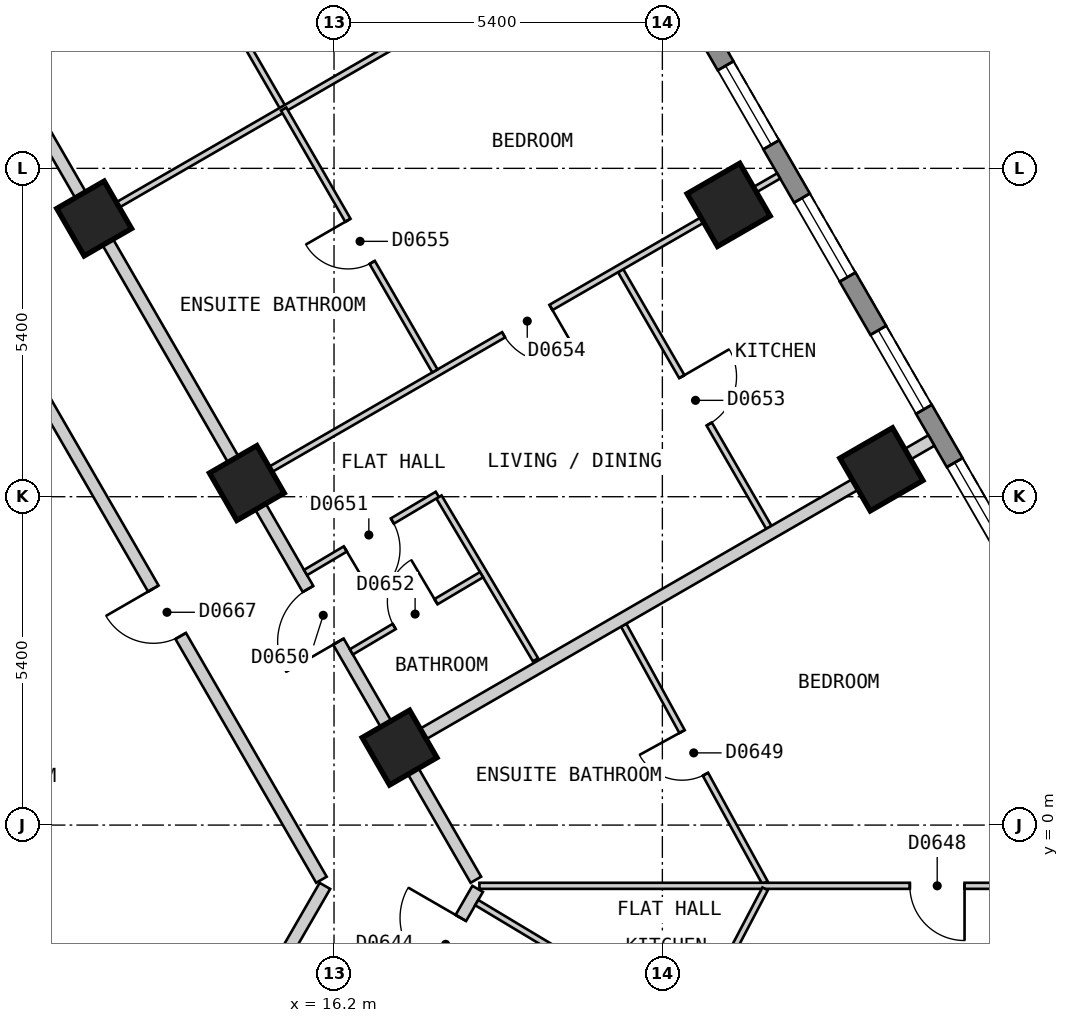
"""IFC4 building model, lengths in metres.
Left out: names, types, materials, properties, quantities, classifications, styles, units other than length and angle.
Written with IfcOpenShell. Run it as: python <this file> out.ifc"""

import sys

from ifc_helpers import new_model, si_unit, direction, frame, frame_2d, origin, origin_2d, place, context, subcontext, project, spatial, polyline, rectangle, outline, extrude, element, fill, save


model = new_model("IFC4")
c1 = context("Model", 3, precision=1e-05, world=origin(), true_north=direction((0.0, 1.0)))
c2 = subcontext(c1, "Body", "Model", "MODEL_VIEW")
j1 = project(units=[si_unit("LENGTHUNIT", "METRE"), si_unit("PLANEANGLEUNIT", "RADIAN")], contexts=[c1])
p1 = place(None, origin())
s1 = spatial("IfcSite", under=j1, at=p1, CompositionType="ELEMENT")
p2 = place(p1, origin())
s2 = spatial("IfcBuilding", under=s1, at=p2, CompositionType="ELEMENT")
p3 = place(p2, frame((0.0, 0.0, 75.0)))
s3 = spatial("IfcBuildingStorey", under=s2, at=p3, CompositionType="ELEMENT", Elevation=75.0)
for number, where, z_axis, x_axis in (
    (1, (25.202, 5.85, 0.0), (0.0, 0.0, 1.0), (-0.5, 0.866, 0.0)),
    (2, (22.69, 10.2, 0.0), (0.0, 0.0, 1.0), (-0.5, 0.866, 0.0)),
):
    element("IfcColumn", number, at=place(p3, frame(where, z_axis=z_axis, x_axis=x_axis)), inside=s3, PredefinedType="COLUMN", context=c2, shape_type="SweptSolid", body=[
        extrude(rectangle(XDim=1.0, YDim=1.0, at=origin_2d()), origin(), (0.0, 0.0, 1.0), 3.0),
    ])
for number, where, z_axis, x_axis in (
    (3, (17.278, 1.274, 0.0), (0.0, 0.0, 1.0), (-0.5, 0.866, 0.0)),
    (4, (14.766, 5.625, 0.0), (0.0, 0.0, 1.0), (-0.5, 0.866, 0.0)),
    (5, (12.255, 9.975, 0.0), (0.0, 0.0, 1.0), (-0.5, 0.866, 0.0)),
):
    element("IfcColumn", number, at=place(p3, frame(where, z_axis=z_axis, x_axis=x_axis)), inside=s3, PredefinedType="COLUMN", context=c2, shape_type="SweptSolid", body=[
        extrude(rectangle(XDim=0.9, YDim=0.9, at=origin_2d()), origin(), (0.0, 0.0, 1.0), 3.0),
    ])
p4 = place(p3, frame((29.027, 1.425, 0.0), z_axis=(0.0, 0.0, 1.0), x_axis=(-0.500027479704, 0.866009537788, 0.0)))
e6 = element("IfcWall", 6, at=p4, inside=s3, PredefinedType="SOLIDWALL", context=c2, shape_type="SweptSolid", body=[
    extrude(outline(polyline([(0.0, -0.15), (26.559, -0.15), (26.478, 0.15), (0.08, 0.15), (0.0, -0.15)])), origin(), (0.0, 0.0, 1.0), 2.7),
])
p5 = place(p4, frame((1.227, 0.0, 0.15)))
e7 = element("IfcOpeningElement", 7, at=p5, cuts=e6, PredefinedType="OPENING", context=c2, shape_type="SweptSolid", body=[
    extrude(rectangle(XDim=1.5, YDim=2.1, at=frame_2d((0.75, 1.05))), frame((0.0, 0.16, 0.0), z_axis=(0.0, -1.0, 0.0), x_axis=(1.0, 0.0, 0.0)), (0.0, 0.0, 1.0), 0.32),
])
p6 = place(p4, frame((3.738, 0.0, 0.15)))
e8 = element("IfcOpeningElement", 8, at=p6, cuts=e6, PredefinedType="OPENING", context=c2, shape_type="SweptSolid", body=[
    extrude(rectangle(XDim=1.5, YDim=2.1, at=frame_2d((0.75, 1.05))), frame((0.0, 0.16, 0.0), z_axis=(0.0, -1.0, 0.0), x_axis=(1.0, 0.0, 0.0)), (0.0, 0.0, 1.0), 0.32),
])
p7 = place(p4, frame((6.25, 0.0, 0.15)))
e9 = element("IfcOpeningElement", 9, at=p7, cuts=e6, PredefinedType="OPENING", context=c2, shape_type="SweptSolid", body=[
    extrude(rectangle(XDim=1.5, YDim=2.1, at=frame_2d((0.75, 1.05))), frame((0.0, 0.16, 0.0), z_axis=(0.0, -1.0, 0.0), x_axis=(1.0, 0.0, 0.0)), (0.0, 0.0, 1.0), 0.32),
])
p8 = place(p4, frame((8.761, 0.0, 0.15)))
e10 = element("IfcOpeningElement", 10, at=p8, cuts=e6, PredefinedType="OPENING", context=c2, shape_type="SweptSolid", body=[
    extrude(rectangle(XDim=1.5, YDim=2.1, at=frame_2d((0.75, 1.05))), frame((0.0, 0.16, 0.0), z_axis=(0.0, -1.0, 0.0), x_axis=(1.0, 0.0, 0.0)), (0.0, 0.0, 1.0), 0.32),
])
p9 = place(p4, frame((11.273, 0.0, 0.15)))
e11 = element("IfcOpeningElement", 11, at=p9, cuts=e6, PredefinedType="OPENING", context=c2, shape_type="SweptSolid", body=[
    extrude(rectangle(XDim=1.5, YDim=2.1, at=frame_2d((0.75, 1.05))), frame((0.0, 0.16, 0.0), z_axis=(0.0, -1.0, 0.0), x_axis=(1.0, 0.0, 0.0)), (0.0, 0.0, 1.0), 0.32),
])
p10 = place(p4, frame((13.785, 0.0, 0.15)))
e12 = element("IfcOpeningElement", 12, at=p10, cuts=e6, PredefinedType="OPENING", context=c2, shape_type="SweptSolid", body=[
    extrude(rectangle(XDim=1.5, YDim=2.1, at=frame_2d((0.75, 1.05))), frame((0.0, 0.16, 0.0), z_axis=(0.0, -1.0, 0.0), x_axis=(1.0, 0.0, 0.0)), (0.0, 0.0, 1.0), 0.32),
])
p11 = place(p4, frame((16.296, 0.0, 0.15)))
e13 = element("IfcOpeningElement", 13, at=p11, cuts=e6, PredefinedType="OPENING", context=c2, shape_type="SweptSolid", body=[
    extrude(rectangle(XDim=1.5, YDim=2.1, at=frame_2d((0.75, 1.05))), frame((0.0, 0.16, 0.0), z_axis=(0.0, -1.0, 0.0), x_axis=(1.0, 0.0, 0.0)), (0.0, 0.0, 1.0), 0.32),
])
p12 = place(p4, frame((18.807, 0.0, 0.15)))
e14 = element("IfcOpeningElement", 14, at=p12, cuts=e6, PredefinedType="OPENING", context=c2, shape_type="SweptSolid", body=[
    extrude(rectangle(XDim=1.5, YDim=2.1, at=frame_2d((0.75, 1.05))), frame((0.0, 0.16, 0.0), z_axis=(0.0, -1.0, 0.0), x_axis=(1.0, 0.0, 0.0)), (0.0, 0.0, 1.0), 0.32),
])
p13 = place(p4, frame((21.319, 0.0, 0.15)))
e15 = element("IfcOpeningElement", 15, at=p13, cuts=e6, PredefinedType="OPENING", context=c2, shape_type="SweptSolid", body=[
    extrude(rectangle(XDim=1.5, YDim=2.1, at=frame_2d((0.75, 1.05))), frame((0.0, 0.16, 0.0), z_axis=(0.0, -1.0, 0.0), x_axis=(1.0, 0.0, 0.0)), (0.0, 0.0, 1.0), 0.32),
])
p14 = place(p4, frame((23.831, 0.0, 0.15)))
e16 = element("IfcOpeningElement", 16, at=p14, cuts=e6, PredefinedType="OPENING", context=c2, shape_type="SweptSolid", body=[
    extrude(rectangle(XDim=1.5, YDim=2.1, at=frame_2d((0.75, 1.05))), frame((0.0, 0.16, 0.0), z_axis=(0.0, -1.0, 0.0), x_axis=(1.0, 0.0, 0.0)), (0.0, 0.0, 1.0), 0.32),
])
p15 = place(p3, frame((10.913, 7.899, 0.0), z_axis=(0.0, 0.0, 1.0), x_axis=(0.500028940566, -0.866008694296, 0.0)))
e17 = element("IfcWall", 17, at=p15, inside=s3, PredefinedType="PARTITIONING", context=c2, shape_type="SweptSolid", body=[
    extrude(rectangle(XDim=10.159, YDim=0.2, at=frame_2d((5.08, 0.0))), origin(), (0.0, 0.0, 1.0), 2.7),
])
p16 = place(p15, frame((4.63, 0.0, 0.0)))
e18 = element("IfcOpeningElement", 18, at=p16, cuts=e17, PredefinedType="OPENING", context=c2, shape_type="SweptSolid", body=[
    extrude(rectangle(XDim=0.9, YDim=2.1, at=frame_2d((0.45, 1.05))), frame((0.0, 0.11, 0.0), z_axis=(0.0, -1.0, 0.0), x_axis=(1.0, 0.0, 0.0)), (0.0, 0.0, 1.0), 0.22),
])
p17 = place(p3, frame((8.488, 16.5, 0.0), z_axis=(0.0, 0.0, 1.0), x_axis=(0.499986836607, -0.86603300354, 0.0)))
e19 = element("IfcWall", 19, at=p17, inside=s3, PredefinedType="PARTITIONING", context=c2, shape_type="SweptSolid", body=[
    extrude(rectangle(XDim=20.09, YDim=0.2, at=frame_2d((10.045, 0.0))), origin(), (0.0, 0.0, 1.0), 2.7),
])
p18 = place(p17, frame((14.569, 0.0, 0.0)))
e20 = element("IfcOpeningElement", 20, at=p18, cuts=e19, PredefinedType="OPENING", context=c2, shape_type="SweptSolid", body=[
    extrude(rectangle(XDim=1.0, YDim=2.1, at=frame_2d((0.5, 1.05))), frame((0.0, 0.11, 0.0), z_axis=(0.0, -1.0, 0.0), x_axis=(1.0, 0.0, 0.0)), (0.0, 0.0, 1.0), 0.22),
])
p19 = place(p3, frame((15.011, -2.8, 0.0), z_axis=(0.0, 0.0, 1.0), x_axis=(0.499929208183, 0.866066271601, 0.0)))
e21 = element("IfcWall", 21, at=p19, inside=s3, PredefinedType="PARTITIONING", context=c2, shape_type="SweptSolid", body=[
    extrude(rectangle(XDim=2.078, YDim=0.2, at=frame_2d((1.039, 0.0))), origin(), (0.0, 0.0, 1.0), 2.7),
])
p20 = place(p3, frame((15.771, -5.884, 0.0), z_axis=(0.0, 0.0, 1.0), x_axis=(0.499939494019, 0.866060334111, 0.0)))
e22 = element("IfcWall", 22, at=p20, inside=s3, PredefinedType="PARTITIONING", context=c2, shape_type="SweptSolid", body=[
    extrude(rectangle(XDim=5.583, YDim=0.2, at=frame_2d((2.792, 0.0))), origin(), (0.0, 0.0, 1.0), 2.7),
])
p21 = place(p20, frame((4.03, 0.0, 0.0)))
e23 = element("IfcOpeningElement", 23, at=p21, cuts=e22, PredefinedType="OPENING", context=c2, shape_type="SweptSolid", body=[
    extrude(rectangle(XDim=1.0, YDim=2.1, at=frame_2d((0.5, 1.05))), frame((0.0, 0.11, 0.0), z_axis=(0.0, -1.0, 0.0), x_axis=(1.0, 0.0, 0.0)), (0.0, 0.0, 1.0), 0.22),
])
p22 = place(p3, frame((17.926, 5.396, 0.0), z_axis=(0.0, 0.0, 1.0), x_axis=(0.510025922017, -0.860159031151, 0.0)))
e24 = element("IfcWall", 24, at=p22, inside=s3, PredefinedType="PARTITIONING", context=c2, shape_type="SweptSolid", body=[
    extrude(rectangle(XDim=3.113, YDim=0.1, at=frame_2d((1.557, 0.0))), origin(), (0.0, 0.0, 1.0), 2.7),
])
p23 = place(p3, frame((12.911, 16.038, 0.0), z_axis=(0.0, 0.0, 1.0), x_axis=(0.499974319101, -0.866040230151, 0.0)))
e25 = element("IfcWall", 25, at=p23, inside=s3, PredefinedType="PARTITIONING", context=c2, shape_type="SweptSolid", body=[
    extrude(rectangle(XDim=4.923, YDim=0.1, at=frame_2d((2.461, 0.0))), origin(), (0.0, 0.0, 1.0), 2.7),
])
p24 = place(p23, frame((2.012, 0.0, 0.0)))
e26 = element("IfcOpeningElement", 26, at=p24, cuts=e25, PredefinedType="OPENING", context=c2, shape_type="SweptSolid", body=[
    extrude(rectangle(XDim=0.8, YDim=2.1, at=frame_2d((0.4, 1.05))), frame((0.0, 0.06, 0.0), z_axis=(0.0, -1.0, 0.0), x_axis=(1.0, 0.0, 0.0)), (0.0, 0.0, 1.0), 0.12),
])
p25 = place(p3, frame((20.914, 9.117, 0.0), z_axis=(0.0, 0.0, 1.0), x_axis=(0.500007182864, -0.866021256716, 0.0)))
e27 = element("IfcWall", 27, at=p25, inside=s3, PredefinedType="PARTITIONING", context=c2, shape_type="SweptSolid", body=[
    extrude(rectangle(XDim=4.874, YDim=0.1, at=frame_2d((2.437, 0.0))), origin(), (0.0, 0.0, 1.0), 2.7),
])
p26 = place(p25, frame((2.012, 0.0, 0.0)))
e28 = element("IfcOpeningElement", 28, at=p26, cuts=e27, PredefinedType="OPENING", context=c2, shape_type="SweptSolid", body=[
    extrude(rectangle(XDim=0.9, YDim=2.1, at=frame_2d((0.45, 1.05))), frame((0.0, 0.06, 0.0), z_axis=(0.0, -1.0, 0.0), x_axis=(1.0, 0.0, 0.0)), (0.0, 0.0, 1.0), 0.12),
])
p27 = place(p3, frame((20.964, 3.287, 0.0), z_axis=(0.0, 0.0, 1.0), x_axis=(0.4810005962, -0.876720266936, 0.0)))
e29 = element("IfcWall", 29, at=p27, inside=s3, PredefinedType="PARTITIONING", context=c2, shape_type="SweptSolid", body=[
    extrude(rectangle(XDim=4.83, YDim=0.1, at=frame_2d((2.415, 0.0))), origin(), (0.0, 0.0, 1.0), 2.7),
])
p28 = place(p27, frame((1.995, 0.0, 0.0)))
e30 = element("IfcOpeningElement", 30, at=p28, cuts=e29, PredefinedType="OPENING", context=c2, shape_type="SweptSolid", body=[
    extrude(rectangle(XDim=0.8, YDim=2.1, at=frame_2d((0.4, 1.05))), frame((0.0, 0.06, 0.0), z_axis=(0.0, -1.0, 0.0), x_axis=(1.0, 0.0, 0.0)), (0.0, 0.0, 1.0), 0.12),
])
p29 = place(p3, frame((18.547, -1.275, 0.0), z_axis=(0.0, 0.0, 1.0), x_axis=(0.85733334763, -0.514761625456, 0.0)))
e31 = element("IfcWall", 31, at=p29, inside=s3, PredefinedType="PARTITIONING", context=c2, shape_type="SweptSolid", body=[
    extrude(rectangle(XDim=4.051, YDim=0.1, at=frame_2d((2.025, 0.0))), origin(), (0.0, 0.0, 1.0), 2.7),
])
p30 = place(p29, frame((1.55, 0.0, 0.0)))
e32 = element("IfcOpeningElement", 32, at=p30, cuts=e31, PredefinedType="OPENING", context=c2, shape_type="SweptSolid", body=[
    extrude(rectangle(XDim=0.9, YDim=2.1, at=frame_2d((0.45, 1.05))), frame((0.0, 0.06, 0.0), z_axis=(0.0, -1.0, 0.0), x_axis=(1.0, 0.0, 0.0)), (0.0, 0.0, 1.0), 0.12),
])
p31 = place(p3, frame((18.591, -0.999, 0.0), z_axis=(0.0, 0.0, 1.0), x_axis=(1.0, 0.0, 0.0)))
e33 = element("IfcWall", 33, at=p31, inside=s3, PredefinedType="PARTITIONING", context=c2, shape_type="SweptSolid", body=[
    extrude(rectangle(XDim=10.266, YDim=0.1, at=frame_2d((5.133, 0.0))), origin(), (0.0, 0.0, 1.0), 2.7),
])
p32 = place(p31, frame((7.079, 0.0, 0.0)))
e34 = element("IfcOpeningElement", 34, at=p32, cuts=e33, PredefinedType="OPENING", context=c2, shape_type="SweptSolid", body=[
    extrude(rectangle(XDim=0.9, YDim=2.1, at=frame_2d((0.45, 1.05))), frame((0.0, 0.06, 0.0), z_axis=(0.0, -1.0, 0.0), x_axis=(1.0, 0.0, 0.0)), (0.0, 0.0, 1.0), 0.12),
])
p33 = place(p3, frame((22.053, -3.403, 0.0), z_axis=(0.0, 0.0, 1.0), x_axis=(0.465190117005, 0.885210796952, 0.0)))
e35 = element("IfcWall", 35, at=p33, inside=s3, PredefinedType="PARTITIONING", context=c2, shape_type="SweptSolid", body=[
    extrude(rectangle(XDim=2.659, YDim=0.1, at=frame_2d((1.33, 0.0))), origin(), (0.0, 0.0, 1.0), 2.7),
])
p34 = place(p3, frame((14.853, 5.675, 0.0), z_axis=(0.0, 0.0, 1.0), x_axis=(0.866016855193, 0.500014806302, 0.0)))
e36 = element("IfcWall", 36, at=p34, inside=s3, PredefinedType="PARTITIONING", context=c2, shape_type="SweptSolid", body=[
    extrude(rectangle(XDim=10.0, YDim=0.1, at=frame_2d((5.0, 0.0))), origin(), (0.0, 0.0, 1.0), 2.7),
])
p35 = place(p34, frame((4.775, 0.0, 0.0)))
e37 = element("IfcOpeningElement", 37, at=p35, cuts=e36, PredefinedType="OPENING", context=c2, shape_type="SweptSolid", body=[
    extrude(rectangle(XDim=0.9, YDim=2.1, at=frame_2d((0.45, 1.05))), frame((0.0, 0.06, 0.0), z_axis=(0.0, -1.0, 0.0), x_axis=(1.0, 0.0, 0.0)), (0.0, 0.0, 1.0), 0.12),
])
p36 = place(p3, frame((12.342, 10.025, 0.0), z_axis=(0.0, 0.0, 1.0), x_axis=(0.865992435864, 0.500057097767, 0.0)))
e38 = element("IfcWall", 38, at=p36, inside=s3, PredefinedType="PARTITIONING", context=c2, shape_type="SweptSolid", body=[
    extrude(rectangle(XDim=9.999, YDim=0.1, at=frame_2d((5.0, 0.0))), origin(), (0.0, 0.0, 1.0), 2.7),
])
p37 = place(p36, frame((6.3, 0.0, 0.0)))
e39 = element("IfcOpeningElement", 39, at=p37, cuts=e38, PredefinedType="OPENING", context=c2, shape_type="SweptSolid", body=[
    extrude(rectangle(XDim=0.9, YDim=2.1, at=frame_2d((0.45, 1.05))), frame((0.0, 0.06, 0.0), z_axis=(0.0, -1.0, 0.0), x_axis=(1.0, 0.0, 0.0)), (0.0, 0.0, 1.0), 0.12),
])
p38 = place(p3, frame((15.732, 4.153, 0.0), z_axis=(0.0, 0.0, 1.0), x_axis=(0.859987631152, 0.510314877566, 0.0)))
e40 = element("IfcWall", 40, at=p38, inside=s3, PredefinedType="PARTITIONING", context=c2, shape_type="SweptSolid", body=[
    extrude(rectangle(XDim=2.52, YDim=0.1, at=frame_2d((1.26, 0.0))), origin(), (0.0, 0.0, 1.0), 2.7),
])
p39 = place(p38, frame((0.76, 0.0, 0.0)))
e41 = element("IfcOpeningElement", 41, at=p39, cuts=e40, PredefinedType="OPENING", context=c2, shape_type="SweptSolid", body=[
    extrude(rectangle(XDim=0.9, YDim=2.1, at=frame_2d((0.45, 1.05))), frame((0.0, 0.06, 0.0), z_axis=(0.0, -1.0, 0.0), x_axis=(1.0, 0.0, 0.0)), (0.0, 0.0, 1.0), 0.12),
])
p40 = place(p3, frame((16.485, 2.848, 0.0), z_axis=(0.0, 0.0, 1.0), x_axis=(0.860052465539, 0.510205602205, 0.0)))
e42 = element("IfcWall", 42, at=p40, inside=s3, PredefinedType="PARTITIONING", context=c2, shape_type="SweptSolid", body=[
    extrude(rectangle(XDim=2.489, YDim=0.1, at=frame_2d((1.245, 0.0))), origin(), (0.0, 0.0, 1.0), 2.7),
])
p41 = place(p40, frame((0.819, 0.0, 0.0)))
e43 = element("IfcOpeningElement", 43, at=p41, cuts=e42, PredefinedType="OPENING", context=c2, shape_type="SweptSolid", body=[
    extrude(rectangle(XDim=0.8, YDim=2.1, at=frame_2d((0.4, 1.05))), frame((0.0, 0.06, 0.0), z_axis=(0.0, -1.0, 0.0), x_axis=(1.0, 0.0, 0.0)), (0.0, 0.0, 1.0), 0.12),
])
p42 = place(p3, frame((17.365, 1.325, 0.0), z_axis=(0.0, 0.0, 1.0), x_axis=(0.866016855193, 0.500014806302, 0.0)))
e44 = element("IfcWall", 44, at=p42, inside=s3, PredefinedType="PARTITIONING", context=c2, shape_type="SweptSolid", body=[
    extrude(rectangle(XDim=10.0, YDim=0.2, at=frame_2d((5.0, 0.0))), origin(), (0.0, 0.0, 1.0), 2.7),
])
p43 = place(p3, frame((15.372, 11.775, 0.0), z_axis=(0.0, 0.0, 1.0), x_axis=(0.500035488351, -0.866004913606, 0.0)))
e45 = element("IfcWall", 45, at=p43, inside=s3, PredefinedType="PARTITIONING", context=c2, shape_type="SweptSolid", body=[
    extrude(rectangle(XDim=4.973, YDim=0.1, at=frame_2d((2.487, 0.0))), origin(), (0.0, 0.0, 1.0), 2.7),
])
p44 = place(p43, frame((2.112, 0.0, 0.0)))
e46 = element("IfcOpeningElement", 46, at=p44, cuts=e45, PredefinedType="OPENING", context=c2, shape_type="SweptSolid", body=[
    extrude(rectangle(XDim=0.8, YDim=2.1, at=frame_2d((0.4, 1.05))), frame((0.0, 0.06, 0.0), z_axis=(0.0, -1.0, 0.0), x_axis=(1.0, 0.0, 0.0)), (0.0, 0.0, 1.0), 0.12),
])
p45 = place(p6, origin())
e47 = element("IfcWindow", 47, at=p45, inside=s3, PartitioningType="SINGLE_PANEL", PredefinedType="WINDOW", context=c2, shape_type="SweptSolid", body=[
    extrude(rectangle(XDim=1.5, YDim=2.1, at=frame_2d((0.75, 1.05))), frame((0.0, 0.03, 0.0), z_axis=(0.0, -1.0, 0.0), x_axis=(1.0, 0.0, 0.0)), (0.0, 0.0, 1.0), 0.06),
])
fill(e8, e47)
p46 = place(p7, origin())
e48 = element("IfcWindow", 48, at=p46, inside=s3, PartitioningType="SINGLE_PANEL", PredefinedType="WINDOW", context=c2, shape_type="SweptSolid", body=[
    extrude(rectangle(XDim=1.5, YDim=2.1, at=frame_2d((0.75, 1.05))), frame((0.0, 0.03, 0.0), z_axis=(0.0, -1.0, 0.0), x_axis=(1.0, 0.0, 0.0)), (0.0, 0.0, 1.0), 0.06),
])
fill(e9, e48)
p47 = place(p8, origin())
e49 = element("IfcWindow", 49, at=p47, inside=s3, PartitioningType="SINGLE_PANEL", PredefinedType="WINDOW", context=c2, shape_type="SweptSolid", body=[
    extrude(rectangle(XDim=1.5, YDim=2.1, at=frame_2d((0.75, 1.05))), frame((0.0, 0.03, 0.0), z_axis=(0.0, -1.0, 0.0), x_axis=(1.0, 0.0, 0.0)), (0.0, 0.0, 1.0), 0.06),
])
fill(e10, e49)
p48 = place(p9, origin())
e50 = element("IfcWindow", 50, at=p48, inside=s3, PartitioningType="SINGLE_PANEL", PredefinedType="WINDOW", context=c2, shape_type="SweptSolid", body=[
    extrude(rectangle(XDim=1.5, YDim=2.1, at=frame_2d((0.75, 1.05))), frame((0.0, 0.03, 0.0), z_axis=(0.0, -1.0, 0.0), x_axis=(1.0, 0.0, 0.0)), (0.0, 0.0, 1.0), 0.06),
])
fill(e11, e50)
p49 = place(p21, origin())
e51 = element("IfcDoor", 51, at=p49, inside=s3, OperationType="SINGLE_SWING_RIGHT", PredefinedType="DOOR", context=c2, shape_type="SweptSolid", body=[
    extrude(rectangle(XDim=1.0, YDim=2.1, at=frame_2d((0.5, 1.05))), frame((0.0, 0.025, 0.0), z_axis=(0.0, -1.0, 0.0), x_axis=(1.0, 0.0, 0.0)), (0.0, 0.0, 1.0), 0.05),
])
fill(e23, e51)
p50 = place(p32, origin())
e52 = element("IfcDoor", 52, at=p50, inside=s3, OperationType="SINGLE_SWING_RIGHT", PredefinedType="DOOR", context=c2, shape_type="SweptSolid", body=[
    extrude(rectangle(XDim=0.9, YDim=2.1, at=frame_2d((0.45, 1.05))), frame((0.0, 0.025, 0.0), z_axis=(0.0, -1.0, 0.0), x_axis=(1.0, 0.0, 0.0)), (0.0, 0.0, 1.0), 0.05),
])
fill(e34, e52)
p51 = place(p28, origin())
e53 = element("IfcDoor", 53, at=p51, inside=s3, OperationType="SINGLE_SWING_LEFT", PredefinedType="DOOR", context=c2, shape_type="SweptSolid", body=[
    extrude(rectangle(XDim=0.8, YDim=2.1, at=frame_2d((0.4, 1.05))), frame((0.0, 0.025, 0.0), z_axis=(0.0, -1.0, 0.0), x_axis=(1.0, 0.0, 0.0)), (0.0, 0.0, 1.0), 0.05),
])
fill(e30, e53)
p52 = place(p18, origin())
e54 = element("IfcDoor", 54, at=p52, inside=s3, OperationType="SINGLE_SWING_RIGHT", PredefinedType="DOOR", context=c2, shape_type="SweptSolid", body=[
    extrude(rectangle(XDim=1.0, YDim=2.1, at=frame_2d((0.5, 1.05))), frame((0.0, 0.025, 0.0), z_axis=(0.0, -1.0, 0.0), x_axis=(1.0, 0.0, 0.0)), (0.0, 0.0, 1.0), 0.05),
])
fill(e20, e54)
p53 = place(p39, origin())
e55 = element("IfcDoor", 55, at=p53, inside=s3, OperationType="SINGLE_SWING_LEFT", PredefinedType="DOOR", context=c2, shape_type="SweptSolid", body=[
    extrude(rectangle(XDim=0.9, YDim=2.1, at=frame_2d((0.45, 1.05))), frame((0.0, 0.025, 0.0), z_axis=(0.0, -1.0, 0.0), x_axis=(1.0, 0.0, 0.0)), (0.0, 0.0, 1.0), 0.05),
])
fill(e41, e55)
p54 = place(p41, origin())
e56 = element("IfcDoor", 56, at=p54, inside=s3, OperationType="SINGLE_SWING_RIGHT", PredefinedType="DOOR", context=c2, shape_type="SweptSolid", body=[
    extrude(rectangle(XDim=0.8, YDim=2.1, at=frame_2d((0.4, 1.05))), frame((0.0, 0.025, 0.0), z_axis=(0.0, -1.0, 0.0), x_axis=(1.0, 0.0, 0.0)), (0.0, 0.0, 1.0), 0.05),
])
fill(e43, e56)
p55 = place(p26, origin())
e57 = element("IfcDoor", 57, at=p55, inside=s3, OperationType="SINGLE_SWING_LEFT", PredefinedType="DOOR", context=c2, shape_type="SweptSolid", body=[
    extrude(rectangle(XDim=0.9, YDim=2.1, at=frame_2d((0.45, 1.05))), frame((0.0, 0.025, 0.0), z_axis=(0.0, -1.0, 0.0), x_axis=(1.0, 0.0, 0.0)), (0.0, 0.0, 1.0), 0.05),
])
fill(e28, e57)
p56 = place(p35, origin())
e58 = element("IfcDoor", 58, at=p56, inside=s3, OperationType="SINGLE_SWING_RIGHT", PredefinedType="DOOR", context=c2, shape_type="SweptSolid", body=[
    extrude(rectangle(XDim=0.9, YDim=2.1, at=frame_2d((0.45, 1.05))), frame((0.0, 0.025, 0.0), z_axis=(0.0, -1.0, 0.0), x_axis=(1.0, 0.0, 0.0)), (0.0, 0.0, 1.0), 0.05),
])
fill(e37, e58)
p57 = place(p44, origin())
e59 = element("IfcDoor", 59, at=p57, inside=s3, OperationType="SINGLE_SWING_LEFT", PredefinedType="DOOR", context=c2, shape_type="SweptSolid", body=[
    extrude(rectangle(XDim=0.8, YDim=2.1, at=frame_2d((0.4, 1.05))), frame((0.0, 0.025, 0.0), z_axis=(0.0, -1.0, 0.0), x_axis=(1.0, 0.0, 0.0)), (0.0, 0.0, 1.0), 0.05),
])
fill(e46, e59)
p58 = place(p16, origin())
e60 = element("IfcDoor", 60, at=p58, inside=s3, OperationType="SINGLE_SWING_LEFT", PredefinedType="DOOR", context=c2, shape_type="SweptSolid", body=[
    extrude(rectangle(XDim=0.9, YDim=2.1, at=frame_2d((0.45, 1.05))), frame((0.0, 0.025, 0.0), z_axis=(0.0, -1.0, 0.0), x_axis=(1.0, 0.0, 0.0)), (0.0, 0.0, 1.0), 0.05),
])
fill(e18, e60)
save(model, sys.argv[1])
